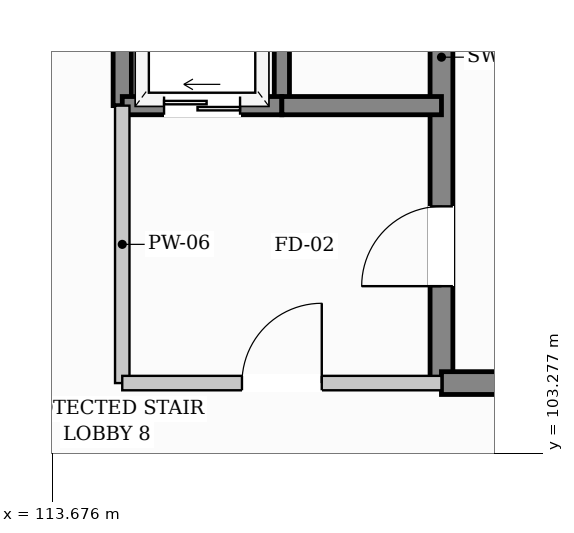
"""IFC4 building model, lengths in metres.
Left out: names, types, materials, properties, quantities, classifications, styles, units other than length and angle.
Written with IfcOpenShell. Run it as: python <this file> out.ifc"""

import sys

from ifc_helpers import new_model, si_unit, direction, frame, frame_2d, origin, place, context, subcontext, project, spatial, rectangle, extrude, element, fill, save


model = new_model("IFC4")
c1 = context("Model", 3, precision=1e-05, world=origin(), true_north=direction((0.0, 1.0)))
c2 = subcontext(c1, "Body", "Model", "MODEL_VIEW")
j1 = project(units=[si_unit("LENGTHUNIT", "METRE"), si_unit("PLANEANGLEUNIT", "RADIAN")], contexts=[c1])
p1 = place(None, origin())
s1 = spatial("IfcSite", under=j1, at=p1, CompositionType="ELEMENT")
p2 = place(p1, origin())
s2 = spatial("IfcBuilding", under=s1, at=p2, CompositionType="ELEMENT")
p3 = place(p2, frame((0.0, 0.0, 16.8)))
s3 = spatial("IfcBuildingStorey", under=s2, at=p3, CompositionType="ELEMENT", Elevation=16.8)
p4 = place(p3, frame((118.8, 104.2, 0.0), z_axis=(0.0, 0.0, 1.0), x_axis=(0.0, 1.0, 0.0)))
e1 = element("IfcWall", 1, at=p4, inside=s3, PredefinedType="SHEAR", context=c2, shape_type="SweptSolid", body=[
    extrude(rectangle(XDim=6.0, YDim=0.3, at=frame_2d((3.0, 0.0))), origin(), (0.0, 0.0, 1.0), 3.32),
])
p5 = place(p4, frame((1.275, 0.0, 0.0)))
e2 = element("IfcOpeningElement", 2, at=p5, cuts=e1, PredefinedType="OPENING", context=c2, shape_type="SweptSolid", body=[
    extrude(rectangle(XDim=1.05, YDim=2.15, at=frame_2d((0.525, 1.075))), frame((0.0, 0.16, 0.0), z_axis=(0.0, -1.0, 0.0), x_axis=(1.0, 0.0, 0.0)), (0.0, 0.0, 1.0), 0.32),
])
p6 = place(p3, frame((118.8, 104.2, 0.0), z_axis=(0.0, 0.0, 1.0), x_axis=(1.0, 0.0, 0.0)))
e3 = element("IfcWall", 3, at=p6, inside=s3, PredefinedType="SHEAR", context=c2, shape_type="SweptSolid", body=[
    extrude(rectangle(XDim=7.0, YDim=0.3, at=frame_2d((3.5, 0.0))), origin(), (0.0, 0.0, 1.0), 3.32),
])
p7 = place(p3, frame((114.6, 107.85, 0.0), z_axis=(0.0, 0.0, 1.0), x_axis=(0.0, 1.0, 0.0)))
e4 = element("IfcWall", 4, at=p7, inside=s3, PredefinedType="SHEAR", context=c2, shape_type="SweptSolid", body=[
    extrude(rectangle(XDim=2.35, YDim=0.24, at=frame_2d((1.175, 0.0))), origin(), (0.0, 0.0, 1.0), 3.32),
])
p8 = place(p3, frame((116.7, 107.85, 0.0), z_axis=(0.0, 0.0, 1.0), x_axis=(0.0, 1.0, 0.0)))
e5 = element("IfcWall", 5, at=p8, inside=s3, PredefinedType="SHEAR", context=c2, shape_type="SweptSolid", body=[
    extrude(rectangle(XDim=2.35, YDim=0.2, at=frame_2d((1.175, 0.0))), origin(), (0.0, 0.0, 1.0), 3.32),
])
p9 = place(p3, frame((114.6, 107.85, 0.0), z_axis=(0.0, 0.0, 1.0), x_axis=(1.0, 0.0, 0.0)))
e6 = element("IfcWall", 6, at=p9, inside=s3, PredefinedType="SHEAR", context=c2, shape_type="SweptSolid", body=[
    extrude(rectangle(XDim=2.1, YDim=0.24, at=frame_2d((1.05, 0.0))), origin(), (0.0, 0.0, 1.0), 3.32),
])
p10 = place(p9, frame((0.55, 0.0, 0.0)))
e7 = element("IfcOpeningElement", 7, at=p10, cuts=e6, PredefinedType="OPENING", context=c2, shape_type="SweptSolid", body=[
    extrude(rectangle(XDim=1.0, YDim=2.1, at=frame_2d((0.5, 1.05))), frame((0.0, 0.13, 0.0), z_axis=(0.0, -1.0, 0.0), x_axis=(1.0, 0.0, 0.0)), (0.0, 0.0, 1.0), 0.26),
])
p11 = place(p3, frame((116.7, 107.85, 0.0), z_axis=(0.0, 0.0, 1.0), x_axis=(1.0, 0.0, 0.0)))
e8 = element("IfcWall", 8, at=p11, inside=s3, PredefinedType="SHEAR", context=c2, shape_type="SweptSolid", body=[
    extrude(rectangle(XDim=2.1, YDim=0.24, at=frame_2d((1.05, 0.0))), origin(), (0.0, 0.0, 1.0), 3.32),
])
p12 = place(p3, frame((114.6, 104.2, 0.0), z_axis=(0.0, 0.0, 1.0), x_axis=(0.0, 1.0, 0.0)))
e9 = element("IfcWall", 9, at=p12, inside=s3, PredefinedType="PARTITIONING", context=c2, shape_type="SweptSolid", body=[
    extrude(rectangle(XDim=3.65, YDim=0.19, at=frame_2d((1.825, 0.0))), origin(), (0.0, 0.0, 1.0), 3.32),
])
p13 = place(p3, frame((114.6, 104.2, 0.0), z_axis=(0.0, 0.0, 1.0), x_axis=(1.0, 0.0, 0.0)))
e10 = element("IfcWall", 10, at=p13, inside=s3, PredefinedType="PARTITIONING", context=c2, shape_type="SweptSolid", body=[
    extrude(rectangle(XDim=4.2, YDim=0.19, at=frame_2d((2.1, 0.0))), origin(), (0.0, 0.0, 1.0), 3.32),
])
p14 = place(p13, frame((1.575, 0.0, 0.0)))
e11 = element("IfcOpeningElement", 11, at=p14, cuts=e10, PredefinedType="OPENING", context=c2, shape_type="SweptSolid", body=[
    extrude(rectangle(XDim=1.05, YDim=2.15, at=frame_2d((0.525, 1.075))), frame((0.0, 0.105, 0.0), z_axis=(0.0, -1.0, 0.0), x_axis=(1.0, 0.0, 0.0)), (0.0, 0.0, 1.0), 0.21),
])
p15 = place(p5, origin())
e12 = element("IfcDoor", 12, at=p15, inside=s3, OperationType="SINGLE_SWING_LEFT", PredefinedType="DOOR", context=c2, shape_type="SweptSolid", body=[
    extrude(rectangle(XDim=1.05, YDim=2.15, at=frame_2d((0.525, 1.075))), frame((0.0, 0.025, 0.0), z_axis=(0.0, -1.0, 0.0), x_axis=(1.0, 0.0, 0.0)), (0.0, 0.0, 1.0), 0.05),
])
fill(e2, e12)
p16 = place(p10, origin())
e13 = element("IfcDoor", 13, at=p16, inside=s3, OperationType="SLIDING_TO_LEFT", PredefinedType="DOOR", context=c2, shape_type="SweptSolid", body=[
    extrude(rectangle(XDim=1.0, YDim=2.1, at=frame_2d((0.5, 1.05))), frame((0.0, 0.025, 0.0), z_axis=(0.0, -1.0, 0.0), x_axis=(1.0, 0.0, 0.0)), (0.0, 0.0, 1.0), 0.05),
])
fill(e7, e13)
p17 = place(p14, origin())
e14 = element("IfcDoor", 14, at=p17, inside=s3, OperationType="SINGLE_SWING_RIGHT", PredefinedType="DOOR", context=c2, shape_type="SweptSolid", body=[
    extrude(rectangle(XDim=1.05, YDim=2.15, at=frame_2d((0.525, 1.075))), frame((0.0, 0.025, 0.0), z_axis=(0.0, -1.0, 0.0), x_axis=(1.0, 0.0, 0.0)), (0.0, 0.0, 1.0), 0.05),
])
fill(e11, e14)
save(model, sys.argv[1])
